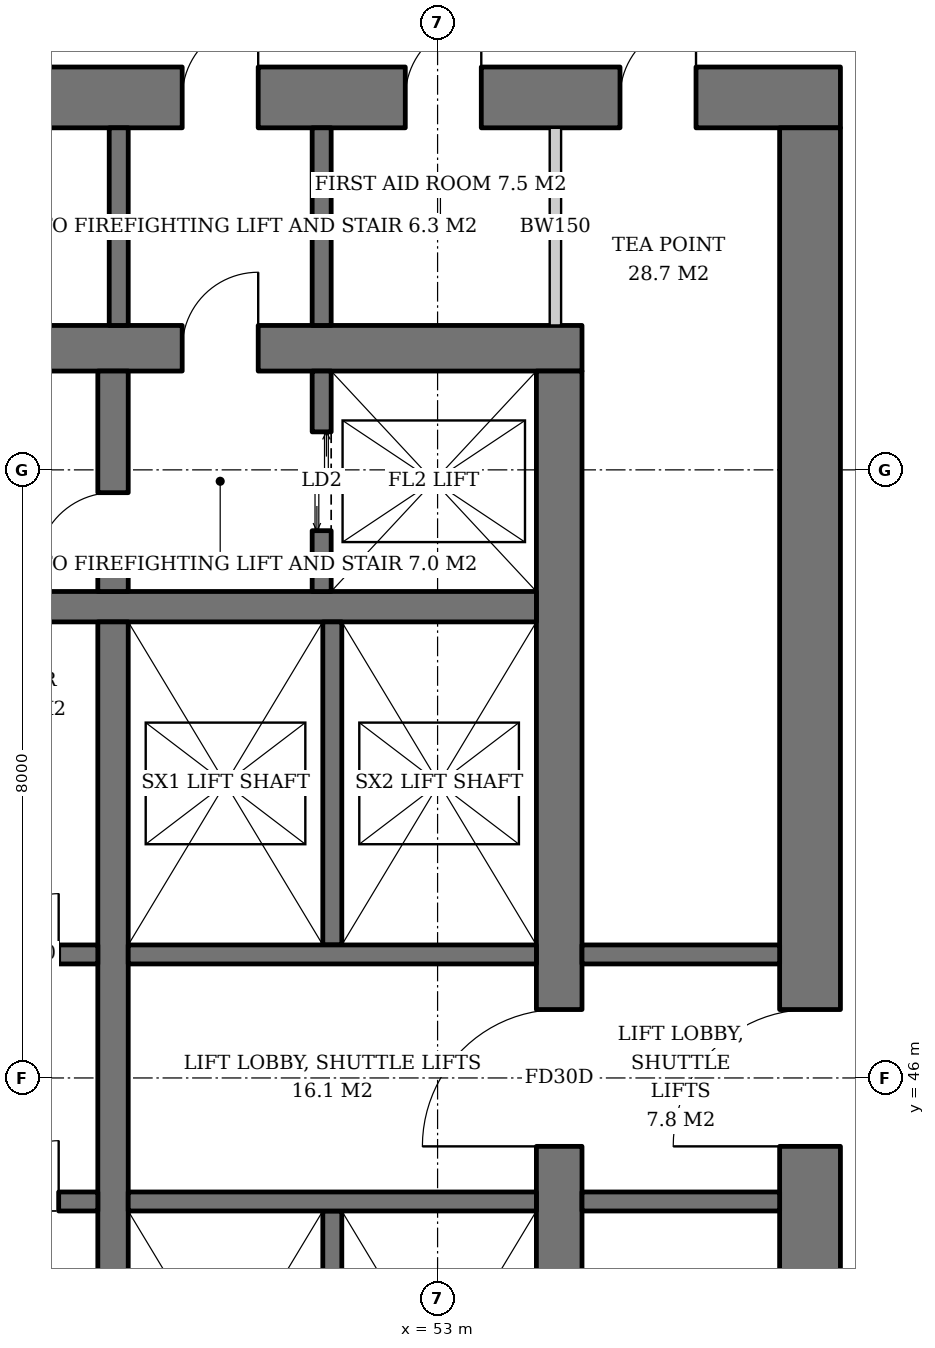
"""IFC4 building model, lengths in metres.
Left out: names, types, materials, properties, quantities, classifications, styles, units other than length and angle.
Written with IfcOpenShell. Run it as: python <this file> out.ifc"""

import sys

from ifc_helpers import new_model, si_unit, direction, frame, frame_2d, origin, place, context, subcontext, project, spatial, rectangle, extrude, element, fill, save


model = new_model("IFC4")
c1 = context("Model", 3, precision=1e-05, world=origin(), true_north=direction((0.0, 1.0)))
c2 = subcontext(c1, "Body", "Model", "MODEL_VIEW")
j1 = project(units=[si_unit("LENGTHUNIT", "METRE"), si_unit("PLANEANGLEUNIT", "RADIAN")], contexts=[c1])
p1 = place(None, origin())
s1 = spatial("IfcSite", under=j1, at=p1, CompositionType="ELEMENT")
p2 = place(p1, origin())
s2 = spatial("IfcBuilding", under=s1, at=p2, CompositionType="ELEMENT")
p3 = place(p2, frame((0.0, 0.0, 28.6)))
s3 = spatial("IfcBuildingStorey", under=s2, at=p3, CompositionType="ELEMENT", Elevation=28.6)
p4 = place(p3, frame((35.1, 55.6, 0.0), z_axis=(0.0, 0.0, 1.0), x_axis=(1.0, 0.0, 0.0)))
e1 = element("IfcWall", 1, at=p4, inside=s3, PredefinedType="SHEAR", context=c2, shape_type="SweptSolid", body=[
    extrude(rectangle(XDim=19.8, YDim=0.6, at=frame_2d((9.9, 0.0))), origin(), (0.0, 0.0, 1.0), 3.8),
])
p5 = place(p4, frame((14.54, 0.0, 0.0)))
e2 = element("IfcOpeningElement", 2, at=p5, cuts=e1, PredefinedType="OPENING", context=c2, shape_type="SweptSolid", body=[
    extrude(rectangle(XDim=1.0, YDim=2.1, at=frame_2d((0.5, 1.05))), frame((0.0, 0.31, 0.0), z_axis=(0.0, -1.0, 0.0), x_axis=(1.0, 0.0, 0.0)), (0.0, 0.0, 1.0), 0.62),
])
p6 = place(p4, frame((2.425, 0.0, 0.0)))
e3 = element("IfcOpeningElement", 3, at=p6, cuts=e1, PredefinedType="OPENING", context=c2, shape_type="SweptSolid", body=[
    extrude(rectangle(XDim=1.0, YDim=2.1, at=frame_2d((0.5, 1.05))), frame((0.0, 0.31, 0.0), z_axis=(0.0, -1.0, 0.0), x_axis=(1.0, 0.0, 0.0)), (0.0, 0.0, 1.0), 0.62),
])
p7 = place(p3, frame((54.6, 36.7, 0.0), z_axis=(0.0, 0.0, 1.0), x_axis=(0.0, 1.0, 0.0)))
e4 = element("IfcWall", 4, at=p7, inside=s3, PredefinedType="SHEAR", context=c2, shape_type="SweptSolid", body=[
    extrude(rectangle(XDim=18.6, YDim=0.6, at=frame_2d((9.3, 0.0))), origin(), (0.0, 0.0, 1.0), 3.8),
])
p8 = place(p7, frame((8.4, 0.0, 0.0)))
e5 = element("IfcOpeningElement", 5, at=p8, cuts=e4, PredefinedType="OPENING", context=c2, shape_type="SweptSolid", body=[
    extrude(rectangle(XDim=1.8, YDim=2.4, at=frame_2d((0.9, 1.2))), frame((0.0, 0.31, 0.0), z_axis=(0.0, -1.0, 0.0), x_axis=(1.0, 0.0, 0.0)), (0.0, 0.0, 1.0), 0.62),
])
p9 = place(p3, frame((31.7, 58.9, 0.0), z_axis=(0.0, 0.0, 1.0), x_axis=(1.0, 0.0, 0.0)))
e6 = element("IfcWall", 6, at=p9, inside=s3, PredefinedType="SHEAR", context=c2, shape_type="SweptSolid", body=[
    extrude(rectangle(XDim=26.6, YDim=0.8, at=frame_2d((13.3, 0.0))), origin(), (0.0, 0.0, 1.0), 3.8),
])
p10 = place(p9, frame((17.94, 0.0, 0.0)))
e7 = element("IfcOpeningElement", 7, at=p10, cuts=e6, PredefinedType="OPENING", context=c2, shape_type="SweptSolid", body=[
    extrude(rectangle(XDim=1.0, YDim=2.1, at=frame_2d((0.5, 1.05))), frame((0.0, 0.41, 0.0), z_axis=(0.0, -1.0, 0.0), x_axis=(1.0, 0.0, 0.0)), (0.0, 0.0, 1.0), 0.82),
])
p11 = place(p9, frame((5.825, 0.0, 0.0)))
e8 = element("IfcOpeningElement", 8, at=p11, cuts=e6, PredefinedType="OPENING", context=c2, shape_type="SweptSolid", body=[
    extrude(rectangle(XDim=1.0, YDim=2.1, at=frame_2d((0.5, 1.05))), frame((0.0, 0.41, 0.0), z_axis=(0.0, -1.0, 0.0), x_axis=(1.0, 0.0, 0.0)), (0.0, 0.0, 1.0), 0.82),
])
p12 = place(p9, frame((1.9, 0.0, 0.0)))
e9 = element("IfcOpeningElement", 9, at=p12, cuts=e6, PredefinedType="OPENING", context=c2, shape_type="SweptSolid", body=[
    extrude(rectangle(XDim=1.0, YDim=2.1, at=frame_2d((0.5, 1.05))), frame((0.0, 0.41, 0.0), z_axis=(0.0, -1.0, 0.0), x_axis=(1.0, 0.0, 0.0)), (0.0, 0.0, 1.0), 0.82),
])
p13 = place(p9, frame((4.134, 0.0, 0.0)))
e10 = element("IfcOpeningElement", 10, at=p13, cuts=e6, PredefinedType="OPENING", context=c2, shape_type="SweptSolid", body=[
    extrude(rectangle(XDim=1.0, YDim=2.1, at=frame_2d((0.5, 1.05))), frame((0.0, 0.41, 0.0), z_axis=(0.0, -1.0, 0.0), x_axis=(1.0, 0.0, 0.0)), (0.0, 0.0, 1.0), 0.82),
])
p14 = place(p9, frame((11.577, 0.0, 0.0)))
e11 = element("IfcOpeningElement", 11, at=p14, cuts=e6, PredefinedType="OPENING", context=c2, shape_type="SweptSolid", body=[
    extrude(rectangle(XDim=1.0, YDim=2.1, at=frame_2d((0.5, 1.05))), frame((0.0, 0.41, 0.0), z_axis=(0.0, -1.0, 0.0), x_axis=(1.0, 0.0, 0.0)), (0.0, 0.0, 1.0), 0.82),
])
p15 = place(p9, frame((20.875, 0.0, 0.0)))
e12 = element("IfcOpeningElement", 12, at=p15, cuts=e6, PredefinedType="OPENING", context=c2, shape_type="SweptSolid", body=[
    extrude(rectangle(XDim=1.0, YDim=2.1, at=frame_2d((0.5, 1.05))), frame((0.0, 0.41, 0.0), z_axis=(0.0, -1.0, 0.0), x_axis=(1.0, 0.0, 0.0)), (0.0, 0.0, 1.0), 0.82),
])
p16 = place(p9, frame((23.7, 0.0, 0.0)))
e13 = element("IfcOpeningElement", 13, at=p16, cuts=e6, PredefinedType="OPENING", context=c2, shape_type="SweptSolid", body=[
    extrude(rectangle(XDim=1.0, YDim=2.1, at=frame_2d((0.5, 1.05))), frame((0.0, 0.41, 0.0), z_axis=(0.0, -1.0, 0.0), x_axis=(1.0, 0.0, 0.0)), (0.0, 0.0, 1.0), 0.82),
])
p17 = place(p3, frame((57.9, 33.5, 0.0), z_axis=(0.0, 0.0, 1.0), x_axis=(0.0, 1.0, 0.0)))
e14 = element("IfcWall", 14, at=p17, inside=s3, PredefinedType="SHEAR", context=c2, shape_type="SweptSolid", body=[
    extrude(rectangle(XDim=25.0, YDim=0.8, at=frame_2d((12.5, 0.0))), origin(), (0.0, 0.0, 1.0), 3.8),
])
p18 = place(p17, frame((11.6, 0.0, 0.0)))
e15 = element("IfcOpeningElement", 15, at=p18, cuts=e14, PredefinedType="OPENING", context=c2, shape_type="SweptSolid", body=[
    extrude(rectangle(XDim=1.8, YDim=2.4, at=frame_2d((0.9, 1.2))), frame((0.0, 0.41, 0.0), z_axis=(0.0, -1.0, 0.0), x_axis=(1.0, 0.0, 0.0)), (0.0, 0.0, 1.0), 0.82),
])
p19 = place(p3, frame((35.7, 52.2, 0.0), z_axis=(0.0, 0.0, 1.0), x_axis=(1.0, 0.0, 0.0)))
e16 = element("IfcWall", 16, at=p19, inside=s3, PredefinedType="SHEAR", context=c2, shape_type="SweptSolid", body=[
    extrude(rectangle(XDim=18.6, YDim=0.4, at=frame_2d((9.3, 0.0))), origin(), (0.0, 0.0, 1.0), 3.8),
])
p20 = place(p3, frame((48.73, 40.0, 0.0), z_axis=(0.0, 0.0, 1.0), x_axis=(0.0, 1.0, 0.0)))
e17 = element("IfcWall", 17, at=p20, inside=s3, PredefinedType="SHEAR", context=c2, shape_type="SweptSolid", body=[
    extrude(rectangle(XDim=12.0, YDim=0.4, at=frame_2d((6.0, 0.0))), origin(), (0.0, 0.0, 1.0), 3.8),
])
p21 = place(p3, frame((48.73, 52.4, 0.0), z_axis=(0.0, 0.0, 1.0), x_axis=(0.0, 1.0, 0.0)))
e18 = element("IfcWall", 18, at=p21, inside=s3, PredefinedType="SHEAR", context=c2, shape_type="SweptSolid", body=[
    extrude(rectangle(XDim=2.9, YDim=0.4, at=frame_2d((1.45, 0.0))), origin(), (0.0, 0.0, 1.0), 3.8),
])
p22 = place(p21, frame((0.3, 0.0, 0.0)))
e19 = element("IfcOpeningElement", 19, at=p22, cuts=e18, PredefinedType="OPENING", context=c2, shape_type="SweptSolid", body=[
    extrude(rectangle(XDim=1.0, YDim=2.1, at=frame_2d((0.5, 1.05))), frame((0.0, 0.21, 0.0), z_axis=(0.0, -1.0, 0.0), x_axis=(1.0, 0.0, 0.0)), (0.0, 0.0, 1.0), 0.42),
])
p23 = place(p3, frame((51.475, 52.4, 0.0), z_axis=(0.0, 0.0, 1.0), x_axis=(0.0, 1.0, 0.0)))
e20 = element("IfcWall", 20, at=p23, inside=s3, PredefinedType="SHEAR", context=c2, shape_type="SweptSolid", body=[
    extrude(rectangle(XDim=2.9, YDim=0.25, at=frame_2d((1.45, 0.0))), origin(), (0.0, 0.0, 1.0), 3.8),
])
p24 = place(p23, frame((0.8, 0.0, 0.0)))
e21 = element("IfcOpeningElement", 21, at=p24, cuts=e20, PredefinedType="OPENING", context=c2, shape_type="SweptSolid", body=[
    extrude(rectangle(XDim=1.3, YDim=2.2, at=frame_2d((0.65, 1.1))), frame((0.0, 0.135, 0.0), z_axis=(0.0, -1.0, 0.0), x_axis=(1.0, 0.0, 0.0)), (0.0, 0.0, 1.0), 0.27),
])
p25 = place(p3, frame((35.7, 47.625, 0.0), z_axis=(0.0, 0.0, 1.0), x_axis=(1.0, 0.0, 0.0)))
e22 = element("IfcWall", 22, at=p25, inside=s3, PredefinedType="SHEAR", context=c2, shape_type="SweptSolid", body=[
    extrude(rectangle(XDim=12.83, YDim=0.25, at=frame_2d((6.415, 0.0))), origin(), (0.0, 0.0, 1.0), 3.8),
])
p26 = place(p25, frame((0.7, 0.0, 0.0)))
e23 = element("IfcOpeningElement", 23, at=p26, cuts=e22, PredefinedType="OPENING", context=c2, shape_type="SweptSolid", body=[
    extrude(rectangle(XDim=1.1, YDim=2.2, at=frame_2d((0.55, 1.1))), frame((0.0, 0.135, 0.0), z_axis=(0.0, -1.0, 0.0), x_axis=(1.0, 0.0, 0.0)), (0.0, 0.0, 1.0), 0.27),
])
p27 = place(p25, frame((3.45, 0.0, 0.0)))
e24 = element("IfcOpeningElement", 24, at=p27, cuts=e22, PredefinedType="OPENING", context=c2, shape_type="SweptSolid", body=[
    extrude(rectangle(XDim=1.1, YDim=2.2, at=frame_2d((0.55, 1.1))), frame((0.0, 0.135, 0.0), z_axis=(0.0, -1.0, 0.0), x_axis=(1.0, 0.0, 0.0)), (0.0, 0.0, 1.0), 0.27),
])
p28 = place(p25, frame((6.2, 0.0, 0.0)))
e25 = element("IfcOpeningElement", 25, at=p28, cuts=e22, PredefinedType="OPENING", context=c2, shape_type="SweptSolid", body=[
    extrude(rectangle(XDim=1.1, YDim=2.2, at=frame_2d((0.55, 1.1))), frame((0.0, 0.135, 0.0), z_axis=(0.0, -1.0, 0.0), x_axis=(1.0, 0.0, 0.0)), (0.0, 0.0, 1.0), 0.27),
])
p29 = place(p25, frame((8.95, 0.0, 0.0)))
e26 = element("IfcOpeningElement", 26, at=p29, cuts=e22, PredefinedType="OPENING", context=c2, shape_type="SweptSolid", body=[
    extrude(rectangle(XDim=1.1, YDim=2.2, at=frame_2d((0.55, 1.1))), frame((0.0, 0.135, 0.0), z_axis=(0.0, -1.0, 0.0), x_axis=(1.0, 0.0, 0.0)), (0.0, 0.0, 1.0), 0.27),
])
p30 = place(p25, frame((11.515, 0.0, 0.0)))
e27 = element("IfcOpeningElement", 27, at=p30, cuts=e22, PredefinedType="OPENING", context=c2, shape_type="SweptSolid", body=[
    extrude(rectangle(XDim=0.8, YDim=2.0, at=frame_2d((0.4, 1.0))), frame((0.0, 0.135, 0.0), z_axis=(0.0, -1.0, 0.0), x_axis=(1.0, 0.0, 0.0)), (0.0, 0.0, 1.0), 0.27),
])
p31 = place(p3, frame((35.7, 44.375, 0.0), z_axis=(0.0, 0.0, 1.0), x_axis=(1.0, 0.0, 0.0)))
e28 = element("IfcWall", 28, at=p31, inside=s3, PredefinedType="SHEAR", context=c2, shape_type="SweptSolid", body=[
    extrude(rectangle(XDim=12.83, YDim=0.25, at=frame_2d((6.415, 0.0))), origin(), (0.0, 0.0, 1.0), 3.8),
])
p32 = place(p31, frame((0.7, 0.0, 0.0)))
e29 = element("IfcOpeningElement", 29, at=p32, cuts=e28, PredefinedType="OPENING", context=c2, shape_type="SweptSolid", body=[
    extrude(rectangle(XDim=1.1, YDim=2.2, at=frame_2d((0.55, 1.1))), frame((0.0, 0.135, 0.0), z_axis=(0.0, -1.0, 0.0), x_axis=(1.0, 0.0, 0.0)), (0.0, 0.0, 1.0), 0.27),
])
p33 = place(p31, frame((3.45, 0.0, 0.0)))
e30 = element("IfcOpeningElement", 30, at=p33, cuts=e28, PredefinedType="OPENING", context=c2, shape_type="SweptSolid", body=[
    extrude(rectangle(XDim=1.1, YDim=2.2, at=frame_2d((0.55, 1.1))), frame((0.0, 0.135, 0.0), z_axis=(0.0, -1.0, 0.0), x_axis=(1.0, 0.0, 0.0)), (0.0, 0.0, 1.0), 0.27),
])
p34 = place(p31, frame((6.2, 0.0, 0.0)))
e31 = element("IfcOpeningElement", 31, at=p34, cuts=e28, PredefinedType="OPENING", context=c2, shape_type="SweptSolid", body=[
    extrude(rectangle(XDim=1.1, YDim=2.2, at=frame_2d((0.55, 1.1))), frame((0.0, 0.135, 0.0), z_axis=(0.0, -1.0, 0.0), x_axis=(1.0, 0.0, 0.0)), (0.0, 0.0, 1.0), 0.27),
])
p35 = place(p31, frame((8.95, 0.0, 0.0)))
e32 = element("IfcOpeningElement", 32, at=p35, cuts=e28, PredefinedType="OPENING", context=c2, shape_type="SweptSolid", body=[
    extrude(rectangle(XDim=1.1, YDim=2.2, at=frame_2d((0.55, 1.1))), frame((0.0, 0.135, 0.0), z_axis=(0.0, -1.0, 0.0), x_axis=(1.0, 0.0, 0.0)), (0.0, 0.0, 1.0), 0.27),
])
p36 = place(p31, frame((11.515, 0.0, 0.0)))
e33 = element("IfcOpeningElement", 33, at=p36, cuts=e28, PredefinedType="OPENING", context=c2, shape_type="SweptSolid", body=[
    extrude(rectangle(XDim=0.8, YDim=2.0, at=frame_2d((0.4, 1.0))), frame((0.0, 0.135, 0.0), z_axis=(0.0, -1.0, 0.0), x_axis=(1.0, 0.0, 0.0)), (0.0, 0.0, 1.0), 0.27),
])
p37 = place(p3, frame((51.615, 47.75, 0.0), z_axis=(0.0, 0.0, 1.0), x_axis=(0.0, 1.0, 0.0)))
e34 = element("IfcWall", 34, at=p37, inside=s3, PredefinedType="SHEAR", context=c2, shape_type="SweptSolid", body=[
    extrude(rectangle(XDim=4.25, YDim=0.25, at=frame_2d((2.125, 0.0))), origin(), (0.0, 0.0, 1.0), 3.8),
])
p38 = place(p3, frame((48.93, 47.625, 0.0), z_axis=(0.0, 0.0, 1.0), x_axis=(1.0, 0.0, 0.0)))
e35 = element("IfcWall", 35, at=p38, inside=s3, PredefinedType="SHEAR", context=c2, shape_type="SweptSolid", body=[
    extrude(rectangle(XDim=5.37, YDim=0.25, at=frame_2d((2.685, 0.0))), origin(), (0.0, 0.0, 1.0), 3.8),
])
p39 = place(p3, frame((51.615, 44.25, 0.0), z_axis=(0.0, 0.0, 1.0), x_axis=(0.0, -1.0, 0.0)))
e36 = element("IfcWall", 36, at=p39, inside=s3, PredefinedType="SHEAR", context=c2, shape_type="SweptSolid", body=[
    extrude(rectangle(XDim=4.25, YDim=0.25, at=frame_2d((2.125, 0.0))), origin(), (0.0, 0.0, 1.0), 3.8),
])
p40 = place(p3, frame((48.93, 44.375, 0.0), z_axis=(0.0, 0.0, 1.0), x_axis=(1.0, 0.0, 0.0)))
e37 = element("IfcWall", 37, at=p40, inside=s3, PredefinedType="SHEAR", context=c2, shape_type="SweptSolid", body=[
    extrude(rectangle(XDim=5.37, YDim=0.25, at=frame_2d((2.685, 0.0))), origin(), (0.0, 0.0, 1.0), 3.8),
])
for number, where, z_axis, x_axis in (
    (38, (48.805, 55.9, 0.0), (0.0, 0.0, 1.0), (0.0, 1.0, 0.0)),
    (39, (51.475, 55.9, 0.0), (0.0, 0.0, 1.0), (0.0, 1.0, 0.0)),
    (40, (54.9, 44.375, 0.0), (0.0, 0.0, 1.0), (1.0, 0.0, 0.0)),
    (41, (54.9, 47.625, 0.0), (0.0, 0.0, 1.0), (1.0, 0.0, 0.0)),
):
    element("IfcWall", number, at=place(p3, frame(where, z_axis=z_axis, x_axis=x_axis)), inside=s3, PredefinedType="SOLIDWALL", context=c2, shape_type="SweptSolid", body=[
        extrude(rectangle(XDim=2.6, YDim=0.25, at=frame_2d((1.3, 0.0))), origin(), (0.0, 0.0, 1.0), 3.62),
    ])
p41 = place(p3, frame((54.55, 55.9, 0.0), z_axis=(0.0, 0.0, 1.0), x_axis=(0.0, 1.0, 0.0)))
e42 = element("IfcWall", 42, at=p41, inside=s3, PredefinedType="SOLIDWALL", context=c2, shape_type="SweptSolid", body=[
    extrude(rectangle(XDim=2.6, YDim=0.15, at=frame_2d((1.3, 0.0))), origin(), (0.0, 0.0, 1.0), 3.62),
])
p42 = place(p24, origin())
e43 = element("IfcDoor", 43, at=p42, inside=s3, OperationType="DOUBLE_DOOR_SLIDING", PredefinedType="DOOR", context=c2, shape_type="SweptSolid", body=[
    extrude(rectangle(XDim=1.3, YDim=2.2, at=frame_2d((0.65, 1.1))), frame((0.0, 0.025, 0.0), z_axis=(0.0, -1.0, 0.0), x_axis=(1.0, 0.0, 0.0)), (0.0, 0.0, 1.0), 0.05),
])
fill(e21, e43)
p43 = place(p30, origin())
e44 = element("IfcDoor", 44, at=p43, inside=s3, OperationType="SINGLE_SWING_RIGHT", PredefinedType="DOOR", context=c2, shape_type="SweptSolid", body=[
    extrude(rectangle(XDim=0.8, YDim=2.0, at=frame_2d((0.4, 1.0))), frame((0.0, 0.025, 0.0), z_axis=(0.0, -1.0, 0.0), x_axis=(1.0, 0.0, 0.0)), (0.0, 0.0, 1.0), 0.05),
])
fill(e27, e44)
p44 = place(p36, origin())
e45 = element("IfcDoor", 45, at=p44, inside=s3, OperationType="SINGLE_SWING_RIGHT", PredefinedType="DOOR", context=c2, shape_type="SweptSolid", body=[
    extrude(rectangle(XDim=0.8, YDim=2.0, at=frame_2d((0.4, 1.0))), frame((0.0, 0.025, 0.0), z_axis=(0.0, -1.0, 0.0), x_axis=(1.0, 0.0, 0.0)), (0.0, 0.0, 1.0), 0.05),
])
fill(e33, e45)
p45 = place(p22, origin())
e46 = element("IfcDoor", 46, at=p45, inside=s3, OperationType="SINGLE_SWING_LEFT", PredefinedType="DOOR", context=c2, shape_type="SweptSolid", body=[
    extrude(rectangle(XDim=1.0, YDim=2.1, at=frame_2d((0.5, 1.05))), frame((0.0, 0.025, 0.0), z_axis=(0.0, -1.0, 0.0), x_axis=(1.0, 0.0, 0.0)), (0.0, 0.0, 1.0), 0.05),
])
fill(e19, e46)
p46 = place(p5, origin())
e47 = element("IfcDoor", 47, at=p46, inside=s3, OperationType="SINGLE_SWING_RIGHT", PredefinedType="DOOR", context=c2, shape_type="SweptSolid", body=[
    extrude(rectangle(XDim=1.0, YDim=2.1, at=frame_2d((0.5, 1.05))), frame((0.0, 0.025, 0.0), z_axis=(0.0, -1.0, 0.0), x_axis=(1.0, 0.0, 0.0)), (0.0, 0.0, 1.0), 0.05),
])
fill(e2, e47)
p47 = place(p8, origin())
e48 = element("IfcDoor", 48, at=p47, inside=s3, OperationType="DOUBLE_DOOR_SINGLE_SWING", PredefinedType="DOOR", context=c2, shape_type="SweptSolid", body=[
    extrude(rectangle(XDim=1.8, YDim=2.4, at=frame_2d((0.9, 1.2))), frame((0.0, 0.025, 0.0), z_axis=(0.0, -1.0, 0.0), x_axis=(1.0, 0.0, 0.0)), (0.0, 0.0, 1.0), 0.05),
])
fill(e5, e48)
p48 = place(p18, origin())
e49 = element("IfcDoor", 49, at=p48, inside=s3, OperationType="DOUBLE_DOOR_SINGLE_SWING", PredefinedType="DOOR", context=c2, shape_type="SweptSolid", body=[
    extrude(rectangle(XDim=1.8, YDim=2.4, at=frame_2d((0.9, 1.2))), frame((0.0, 0.025, 0.0), z_axis=(0.0, -1.0, 0.0), x_axis=(1.0, 0.0, 0.0)), (0.0, 0.0, 1.0), 0.05),
])
fill(e15, e49)
p49 = place(p10, origin())
e50 = element("IfcDoor", 50, at=p49, inside=s3, OperationType="SINGLE_SWING_RIGHT", PredefinedType="DOOR", context=c2, shape_type="SweptSolid", body=[
    extrude(rectangle(XDim=1.0, YDim=2.1, at=frame_2d((0.5, 1.05))), frame((0.0, 0.025, 0.0), z_axis=(0.0, -1.0, 0.0), x_axis=(1.0, 0.0, 0.0)), (0.0, 0.0, 1.0), 0.05),
])
fill(e7, e50)
p50 = place(p15, origin())
e51 = element("IfcDoor", 51, at=p50, inside=s3, OperationType="SINGLE_SWING_RIGHT", PredefinedType="DOOR", context=c2, shape_type="SweptSolid", body=[
    extrude(rectangle(XDim=1.0, YDim=2.1, at=frame_2d((0.5, 1.05))), frame((0.0, -0.34, 0.0), z_axis=(0.0, -1.0, 0.0), x_axis=(1.0, 0.0, 0.0)), (0.0, 0.0, 1.0), 0.05),
])
fill(e12, e51)
p51 = place(p16, origin())
e52 = element("IfcDoor", 52, at=p51, inside=s3, OperationType="SINGLE_SWING_RIGHT", PredefinedType="DOOR", context=c2, shape_type="SweptSolid", body=[
    extrude(rectangle(XDim=1.0, YDim=2.1, at=frame_2d((0.5, 1.05))), frame((0.0, -0.34, 0.0), z_axis=(0.0, -1.0, 0.0), x_axis=(1.0, 0.0, 0.0)), (0.0, 0.0, 1.0), 0.05),
])
fill(e13, e52)
save(model, sys.argv[1])
